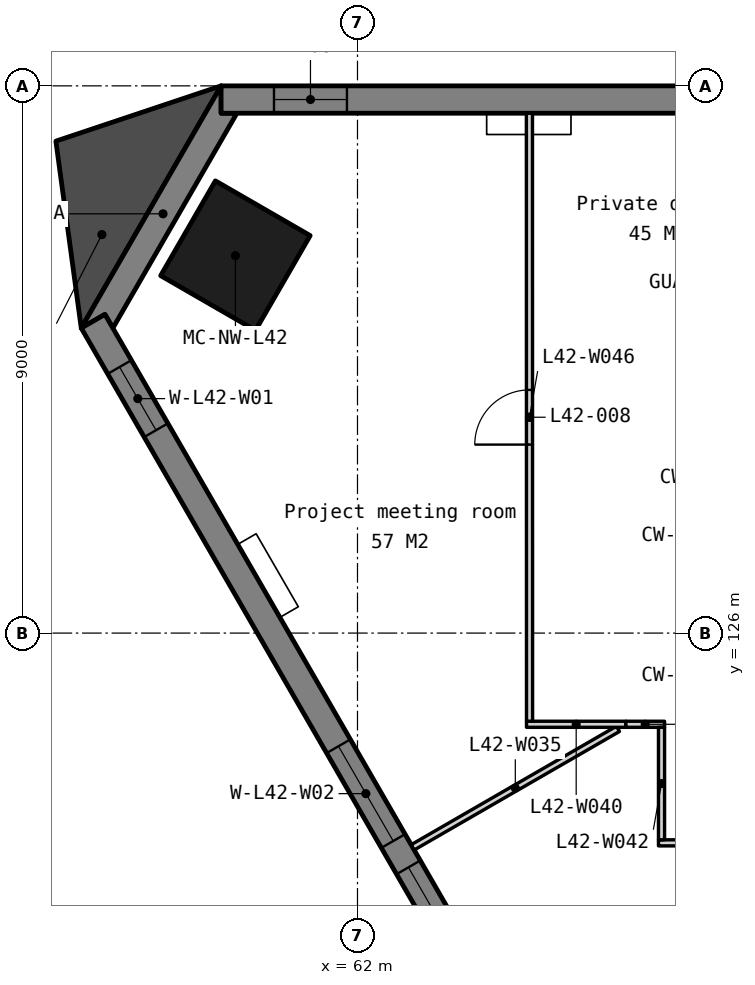
"""IFC4 building model, lengths in metres.
Left out: names, types, materials, properties, quantities, classifications, styles, units other than length and angle.
Written with IfcOpenShell. Run it as: python <this file> out.ifc"""

import sys

from ifc_helpers import new_model, si_unit, direction, frame, frame_2d, origin, origin_2d, place, context, subcontext, project, spatial, polyline, rectangle, outline, extrude, element, fill, save


model = new_model("IFC4")
c1 = context("Model", 3, precision=1e-05, world=origin(), true_north=direction((0.0, 1.0)))
c2 = subcontext(c1, "Body", "Model", "MODEL_VIEW")
j1 = project(units=[si_unit("LENGTHUNIT", "METRE"), si_unit("PLANEANGLEUNIT", "RADIAN")], contexts=[c1])
p1 = place(None, origin())
s1 = spatial("IfcSite", under=j1, at=p1, CompositionType="ELEMENT")
p2 = place(p1, origin())
s2 = spatial("IfcBuilding", under=s1, at=p2, CompositionType="ELEMENT")
p3 = place(p2, frame((0.0, 0.0, 167.6)))
s3 = spatial("IfcBuildingStorey", under=s2, at=p3, CompositionType="ELEMENT", Elevation=167.6)
p4 = place(p3, frame((59.993, 132.208, 0.0), z_axis=(0.0, 0.0, 1.0), x_axis=(-0.5, -0.866025403784, 0.0)))
e1 = element("IfcColumn", 1, at=p4, inside=s3, PredefinedType="COLUMN", context=c2, shape_type="SweptSolid", body=[
    extrude(rectangle(XDim=1.8, YDim=1.8, at=origin_2d()), origin(), (0.0, 0.0, 1.0), 3.9),
])
p5 = place(p3, frame((0.0, 0.0, -0.15)))
e2 = element("IfcWall", 2, at=p5, inside=s3, PredefinedType="SOLIDWALL", context=c2, shape_type="SweptSolid", body=[
    extrude(outline(polyline([(59.757, 135.0), (59.757, 134.55), (60.017, 134.55), (57.977, 131.016), (57.847, 131.241), (57.457, 131.016), (59.757, 135.0)])), origin(), (0.0, 0.0, 1.0), 3.9),
])
p6 = place(p3, frame((100.243, 134.775, -0.15), z_axis=(0.0, 0.0, 1.0), x_axis=(-1.0, 0.0, 0.0)))
e3 = element("IfcWall", 3, at=p6, inside=s3, PredefinedType="SOLIDWALL", context=c2, shape_type="SweptSolid", body=[
    extrude(outline(polyline([(40.486, 0.0), (40.486, 3.9), (0.0, 3.9), (0.0, 0.0), (40.486, 0.0)])), frame((0.0, 0.225, 0.0), z_axis=(0.0, -1.0, 0.0), x_axis=(1.0, 0.0, 0.0)), (0.0, 0.0, 1.0), 0.45),
])
p7 = place(p6, frame((0.87, 0.0, 0.95)))
e4 = element("IfcOpeningElement", 4, at=p7, cuts=e3, PredefinedType="OPENING", context=c2, shape_type="SweptSolid", body=[
    extrude(rectangle(XDim=1.2, YDim=2.2, at=frame_2d((0.6, 1.1))), frame((0.0, 0.235, 0.0), z_axis=(0.0, -1.0, 0.0), x_axis=(1.0, 0.0, 0.0)), (0.0, 0.0, 1.0), 0.47),
])
p8 = place(p6, frame((8.072, 0.0, 0.95)))
e5 = element("IfcOpeningElement", 5, at=p8, cuts=e3, PredefinedType="OPENING", context=c2, shape_type="SweptSolid", body=[
    extrude(rectangle(XDim=1.8, YDim=2.2, at=frame_2d((0.9, 1.1))), frame((0.0, 0.235, 0.0), z_axis=(0.0, -1.0, 0.0), x_axis=(1.0, 0.0, 0.0)), (0.0, 0.0, 1.0), 0.47),
])
p9 = place(p6, frame((10.372, 0.0, 0.95)))
e6 = element("IfcOpeningElement", 6, at=p9, cuts=e3, PredefinedType="OPENING", context=c2, shape_type="SweptSolid", body=[
    extrude(rectangle(XDim=1.8, YDim=2.2, at=frame_2d((0.9, 1.1))), frame((0.0, 0.235, 0.0), z_axis=(0.0, -1.0, 0.0), x_axis=(1.0, 0.0, 0.0)), (0.0, 0.0, 1.0), 0.47),
])
p10 = place(p6, frame((18.193, 0.0, 0.95)))
e7 = element("IfcOpeningElement", 7, at=p10, cuts=e3, PredefinedType="OPENING", context=c2, shape_type="SweptSolid", body=[
    extrude(rectangle(XDim=1.8, YDim=2.2, at=frame_2d((0.9, 1.1))), frame((0.0, 0.235, 0.0), z_axis=(0.0, -1.0, 0.0), x_axis=(1.0, 0.0, 0.0)), (0.0, 0.0, 1.0), 0.47),
])
p11 = place(p6, frame((20.493, 0.0, 0.95)))
e8 = element("IfcOpeningElement", 8, at=p11, cuts=e3, PredefinedType="OPENING", context=c2, shape_type="SweptSolid", body=[
    extrude(rectangle(XDim=1.8, YDim=2.2, at=frame_2d((0.9, 1.1))), frame((0.0, 0.235, 0.0), z_axis=(0.0, -1.0, 0.0), x_axis=(1.0, 0.0, 0.0)), (0.0, 0.0, 1.0), 0.47),
])
p12 = place(p6, frame((28.315, 0.0, 0.95)))
e9 = element("IfcOpeningElement", 9, at=p12, cuts=e3, PredefinedType="OPENING", context=c2, shape_type="SweptSolid", body=[
    extrude(rectangle(XDim=1.8, YDim=2.2, at=frame_2d((0.9, 1.1))), frame((0.0, 0.235, 0.0), z_axis=(0.0, -1.0, 0.0), x_axis=(1.0, 0.0, 0.0)), (0.0, 0.0, 1.0), 0.47),
])
p13 = place(p6, frame((30.615, 0.0, 0.95)))
e10 = element("IfcOpeningElement", 10, at=p13, cuts=e3, PredefinedType="OPENING", context=c2, shape_type="SweptSolid", body=[
    extrude(rectangle(XDim=1.8, YDim=2.2, at=frame_2d((0.9, 1.1))), frame((0.0, 0.235, 0.0), z_axis=(0.0, -1.0, 0.0), x_axis=(1.0, 0.0, 0.0)), (0.0, 0.0, 1.0), 0.47),
])
p14 = place(p6, frame((38.417, 0.0, 0.95)))
e11 = element("IfcOpeningElement", 11, at=p14, cuts=e3, PredefinedType="OPENING", context=c2, shape_type="SweptSolid", body=[
    extrude(rectangle(XDim=1.2, YDim=2.2, at=frame_2d((0.6, 1.1))), frame((0.0, 0.235, 0.0), z_axis=(0.0, -1.0, 0.0), x_axis=(1.0, 0.0, 0.0)), (0.0, 0.0, 1.0), 0.47),
])
p15 = place(p3, frame((57.652, 131.129, -0.15), z_axis=(0.0, 0.0, 1.0), x_axis=(0.499997369791, -0.866026922331, 0.0)))
e12 = element("IfcWall", 12, at=p15, inside=s3, PredefinedType="SOLIDWALL", context=c2, shape_type="SweptSolid", body=[
    extrude(outline(polyline([(40.486, 0.0), (40.486, 3.9), (0.0, 3.9), (0.0, 0.0), (40.486, 0.0)])), frame((0.0, 0.225, 0.0), z_axis=(0.0, -1.0, 0.0), x_axis=(1.0, 0.0, 0.0)), (0.0, 0.0, 1.0), 0.45),
])
p16 = place(p15, frame((0.87, 0.0, 0.95)))
e13 = element("IfcOpeningElement", 13, at=p16, cuts=e12, PredefinedType="OPENING", context=c2, shape_type="SweptSolid", body=[
    extrude(rectangle(XDim=1.2, YDim=2.2, at=frame_2d((0.6, 1.1))), frame((0.0, 0.235, 0.0), z_axis=(0.0, -1.0, 0.0), x_axis=(1.0, 0.0, 0.0)), (0.0, 0.0, 1.0), 0.47),
])
p17 = place(p15, frame((8.072, 0.0, 0.95)))
e14 = element("IfcOpeningElement", 14, at=p17, cuts=e12, PredefinedType="OPENING", context=c2, shape_type="SweptSolid", body=[
    extrude(rectangle(XDim=1.8, YDim=2.2, at=frame_2d((0.9, 1.1))), frame((0.0, 0.235, 0.0), z_axis=(0.0, -1.0, 0.0), x_axis=(1.0, 0.0, 0.0)), (0.0, 0.0, 1.0), 0.47),
])
p18 = place(p15, frame((10.372, 0.0, 0.95)))
e15 = element("IfcOpeningElement", 15, at=p18, cuts=e12, PredefinedType="OPENING", context=c2, shape_type="SweptSolid", body=[
    extrude(rectangle(XDim=1.8, YDim=2.2, at=frame_2d((0.9, 1.1))), frame((0.0, 0.235, 0.0), z_axis=(0.0, -1.0, 0.0), x_axis=(1.0, 0.0, 0.0)), (0.0, 0.0, 1.0), 0.47),
])
p19 = place(p15, frame((18.193, 0.0, 0.95)))
e16 = element("IfcOpeningElement", 16, at=p19, cuts=e12, PredefinedType="OPENING", context=c2, shape_type="SweptSolid", body=[
    extrude(rectangle(XDim=1.8, YDim=2.2, at=frame_2d((0.9, 1.1))), frame((0.0, 0.235, 0.0), z_axis=(0.0, -1.0, 0.0), x_axis=(1.0, 0.0, 0.0)), (0.0, 0.0, 1.0), 0.47),
])
p20 = place(p15, frame((20.493, 0.0, 0.95)))
e17 = element("IfcOpeningElement", 17, at=p20, cuts=e12, PredefinedType="OPENING", context=c2, shape_type="SweptSolid", body=[
    extrude(rectangle(XDim=1.8, YDim=2.2, at=frame_2d((0.9, 1.1))), frame((0.0, 0.235, 0.0), z_axis=(0.0, -1.0, 0.0), x_axis=(1.0, 0.0, 0.0)), (0.0, 0.0, 1.0), 0.47),
])
p21 = place(p15, frame((28.315, 0.0, 0.95)))
e18 = element("IfcOpeningElement", 18, at=p21, cuts=e12, PredefinedType="OPENING", context=c2, shape_type="SweptSolid", body=[
    extrude(rectangle(XDim=1.8, YDim=2.2, at=frame_2d((0.9, 1.1))), frame((0.0, 0.235, 0.0), z_axis=(0.0, -1.0, 0.0), x_axis=(1.0, 0.0, 0.0)), (0.0, 0.0, 1.0), 0.47),
])
p22 = place(p15, frame((30.615, 0.0, 0.95)))
e19 = element("IfcOpeningElement", 19, at=p22, cuts=e12, PredefinedType="OPENING", context=c2, shape_type="SweptSolid", body=[
    extrude(rectangle(XDim=1.8, YDim=2.2, at=frame_2d((0.9, 1.1))), frame((0.0, 0.235, 0.0), z_axis=(0.0, -1.0, 0.0), x_axis=(1.0, 0.0, 0.0)), (0.0, 0.0, 1.0), 0.47),
])
p23 = place(p15, frame((38.417, 0.0, 0.95)))
e20 = element("IfcOpeningElement", 20, at=p23, cuts=e12, PredefinedType="OPENING", context=c2, shape_type="SweptSolid", body=[
    extrude(rectangle(XDim=1.2, YDim=2.2, at=frame_2d((0.6, 1.1))), frame((0.0, 0.235, 0.0), z_axis=(0.0, -1.0, 0.0), x_axis=(1.0, 0.0, 0.0)), (0.0, 0.0, 1.0), 0.47),
])
p24 = place(p3, frame((0.0, 0.0, -0.15)))
e21 = element("IfcWall", 21, at=p24, inside=s3, PredefinedType="SOLIDWALL", context=c2, shape_type="SweptSolid", body=[
    extrude(outline(polyline([(59.757, 135.0), (57.04, 134.091), (57.457, 131.016), (59.757, 135.0)])), origin(), (0.0, 0.0, 1.0), 3.9),
])
p25 = place(p3, frame((65.438, 118.093, 0.0), z_axis=(0.0, 0.0, 1.0), x_axis=(0.866029768103, 0.499992440702, 0.0)))
e22 = element("IfcWall", 22, at=p25, inside=s3, PredefinedType="PARTITIONING", context=c2, shape_type="SweptSolid", body=[
    extrude(rectangle(XDim=8.089, YDim=0.1, at=frame_2d((4.044, 0.0))), origin(), (0.0, 0.0, 1.0), 3.75),
])
p26 = place(p25, frame((3.594, 0.0, 0.0)))
e23 = element("IfcOpeningElement", 23, at=p26, cuts=e22, PredefinedType="OPENING", context=c2, shape_type="SweptSolid", body=[
    extrude(rectangle(XDim=0.9, YDim=2.1, at=frame_2d((0.45, 1.05))), frame((0.0, 0.06, 0.0), z_axis=(0.0, -1.0, 0.0), x_axis=(1.0, 0.0, 0.0)), (0.0, 0.0, 1.0), 0.12),
])
p27 = place(p3, frame((62.907, 122.476, 0.0), z_axis=(0.0, 0.0, 1.0), x_axis=(0.866014543207, 0.500018810599, 0.0)))
e24 = element("IfcWall", 24, at=p27, inside=s3, PredefinedType="PARTITIONING", context=c2, shape_type="SweptSolid", body=[
    extrude(rectangle(XDim=3.898, YDim=0.1, at=frame_2d((1.949, 0.0))), origin(), (0.0, 0.0, 1.0), 3.75),
])
p28 = place(p3, frame((66.95, 122.55, 0.0), z_axis=(0.0, 0.0, 1.0), x_axis=(1.0, 0.0, 0.0)))
e25 = element("IfcWall", 25, at=p28, inside=s3, PredefinedType="PARTITIONING", context=c2, shape_type="SweptSolid", body=[
    extrude(rectangle(XDim=2.05, YDim=0.1, at=frame_2d((1.025, 0.0))), origin(), (0.0, 0.0, 1.0), 3.75),
])
p29 = place(p28, frame((0.575, 0.0, 0.0)))
e26 = element("IfcOpeningElement", 26, at=p29, cuts=e25, PredefinedType="OPENING", context=c2, shape_type="SweptSolid", body=[
    extrude(rectangle(XDim=0.9, YDim=2.1, at=frame_2d((0.45, 1.05))), frame((0.0, 0.06, 0.0), z_axis=(0.0, -1.0, 0.0), x_axis=(1.0, 0.0, 0.0)), (0.0, 0.0, 1.0), 0.12),
])
p30 = place(p3, frame((64.78, 124.5, 0.0), z_axis=(0.0, 0.0, 1.0), x_axis=(1.0, 0.0, 0.0)))
e27 = element("IfcWall", 27, at=p30, inside=s3, PredefinedType="PARTITIONING", context=c2, shape_type="SweptSolid", body=[
    extrude(rectangle(XDim=1.634, YDim=0.1, at=frame_2d((0.817, 0.0))), origin(), (0.0, 0.0, 1.0), 3.75),
])
p31 = place(p3, frame((66.414, 124.5, 0.0), z_axis=(0.0, 0.0, 1.0), x_axis=(1.0, 0.0, 0.0)))
e28 = element("IfcWall", 28, at=p31, inside=s3, PredefinedType="PARTITIONING", context=c2, shape_type="SweptSolid", body=[
    extrude(rectangle(XDim=0.636, YDim=0.1, at=frame_2d((0.318, 0.0))), origin(), (0.0, 0.0, 1.0), 3.75),
])
p32 = place(p3, frame((67.0, 122.6, 0.0), z_axis=(0.0, 0.0, 1.0), x_axis=(0.0, 1.0, 0.0)))
e29 = element("IfcWall", 29, at=p32, inside=s3, PredefinedType="PARTITIONING", context=c2, shape_type="SweptSolid", body=[
    extrude(rectangle(XDim=1.85, YDim=0.1, at=frame_2d((0.925, 0.0))), origin(), (0.0, 0.0, 1.0), 3.75),
])
p33 = place(p3, frame((64.83, 124.55, 0.0), z_axis=(0.0, 0.0, 1.0), x_axis=(-0.000195312496, 0.999999980927, 0.0)))
e30 = element("IfcWall", 30, at=p33, inside=s3, PredefinedType="PARTITIONING", context=c2, shape_type="SweptSolid", body=[
    extrude(rectangle(XDim=10.0, YDim=0.1, at=frame_2d((5.0, 0.0))), origin(), (0.0, 0.0, 1.0), 3.75),
])
p34 = place(p33, frame((4.55, 0.0, 0.0)))
e31 = element("IfcOpeningElement", 31, at=p34, cuts=e30, PredefinedType="OPENING", context=c2, shape_type="SweptSolid", body=[
    extrude(rectangle(XDim=0.9, YDim=2.1, at=frame_2d((0.45, 1.05))), frame((0.0, 0.06, 0.0), z_axis=(0.0, -1.0, 0.0), x_axis=(1.0, 0.0, 0.0)), (0.0, 0.0, 1.0), 0.12),
])
p35 = place(p14, origin())
e32 = element("IfcWindow", 32, at=p35, inside=s3, PartitioningType="SINGLE_PANEL", PredefinedType="WINDOW", context=c2, shape_type="SweptSolid", body=[
    extrude(rectangle(XDim=1.2, YDim=2.2, at=frame_2d((0.6, 1.1))), frame((0.0, 0.03, 0.0), z_axis=(0.0, -1.0, 0.0), x_axis=(1.0, 0.0, 0.0)), (0.0, 0.0, 1.0), 0.06),
])
fill(e11, e32)
p36 = place(p16, origin())
e33 = element("IfcWindow", 33, at=p36, inside=s3, PartitioningType="SINGLE_PANEL", PredefinedType="WINDOW", context=c2, shape_type="SweptSolid", body=[
    extrude(rectangle(XDim=1.2, YDim=2.2, at=frame_2d((0.6, 1.1))), frame((0.0, 0.03, 0.0), z_axis=(0.0, -1.0, 0.0), x_axis=(1.0, 0.0, 0.0)), (0.0, 0.0, 1.0), 0.06),
])
fill(e13, e33)
p37 = place(p17, origin())
e34 = element("IfcWindow", 34, at=p37, inside=s3, PartitioningType="SINGLE_PANEL", PredefinedType="WINDOW", context=c2, shape_type="SweptSolid", body=[
    extrude(rectangle(XDim=1.8, YDim=2.2, at=frame_2d((0.9, 1.1))), frame((0.0, 0.03, 0.0), z_axis=(0.0, -1.0, 0.0), x_axis=(1.0, 0.0, 0.0)), (0.0, 0.0, 1.0), 0.06),
])
fill(e14, e34)
p38 = place(p18, origin())
e35 = element("IfcWindow", 35, at=p38, inside=s3, PartitioningType="SINGLE_PANEL", PredefinedType="WINDOW", context=c2, shape_type="SweptSolid", body=[
    extrude(rectangle(XDim=1.8, YDim=2.2, at=frame_2d((0.9, 1.1))), frame((0.0, 0.03, 0.0), z_axis=(0.0, -1.0, 0.0), x_axis=(1.0, 0.0, 0.0)), (0.0, 0.0, 1.0), 0.06),
])
fill(e15, e35)
p39 = place(p34, origin())
e36 = element("IfcDoor", 36, at=p39, inside=s3, OperationType="SINGLE_SWING_LEFT", PredefinedType="DOOR", context=c2, shape_type="SweptSolid", body=[
    extrude(rectangle(XDim=0.9, YDim=2.1, at=frame_2d((0.45, 1.05))), frame((0.0, 0.025, 0.0), z_axis=(0.0, -1.0, 0.0), x_axis=(1.0, 0.0, 0.0)), (0.0, 0.0, 1.0), 0.05),
])
fill(e31, e36)
save(model, sys.argv[1])
